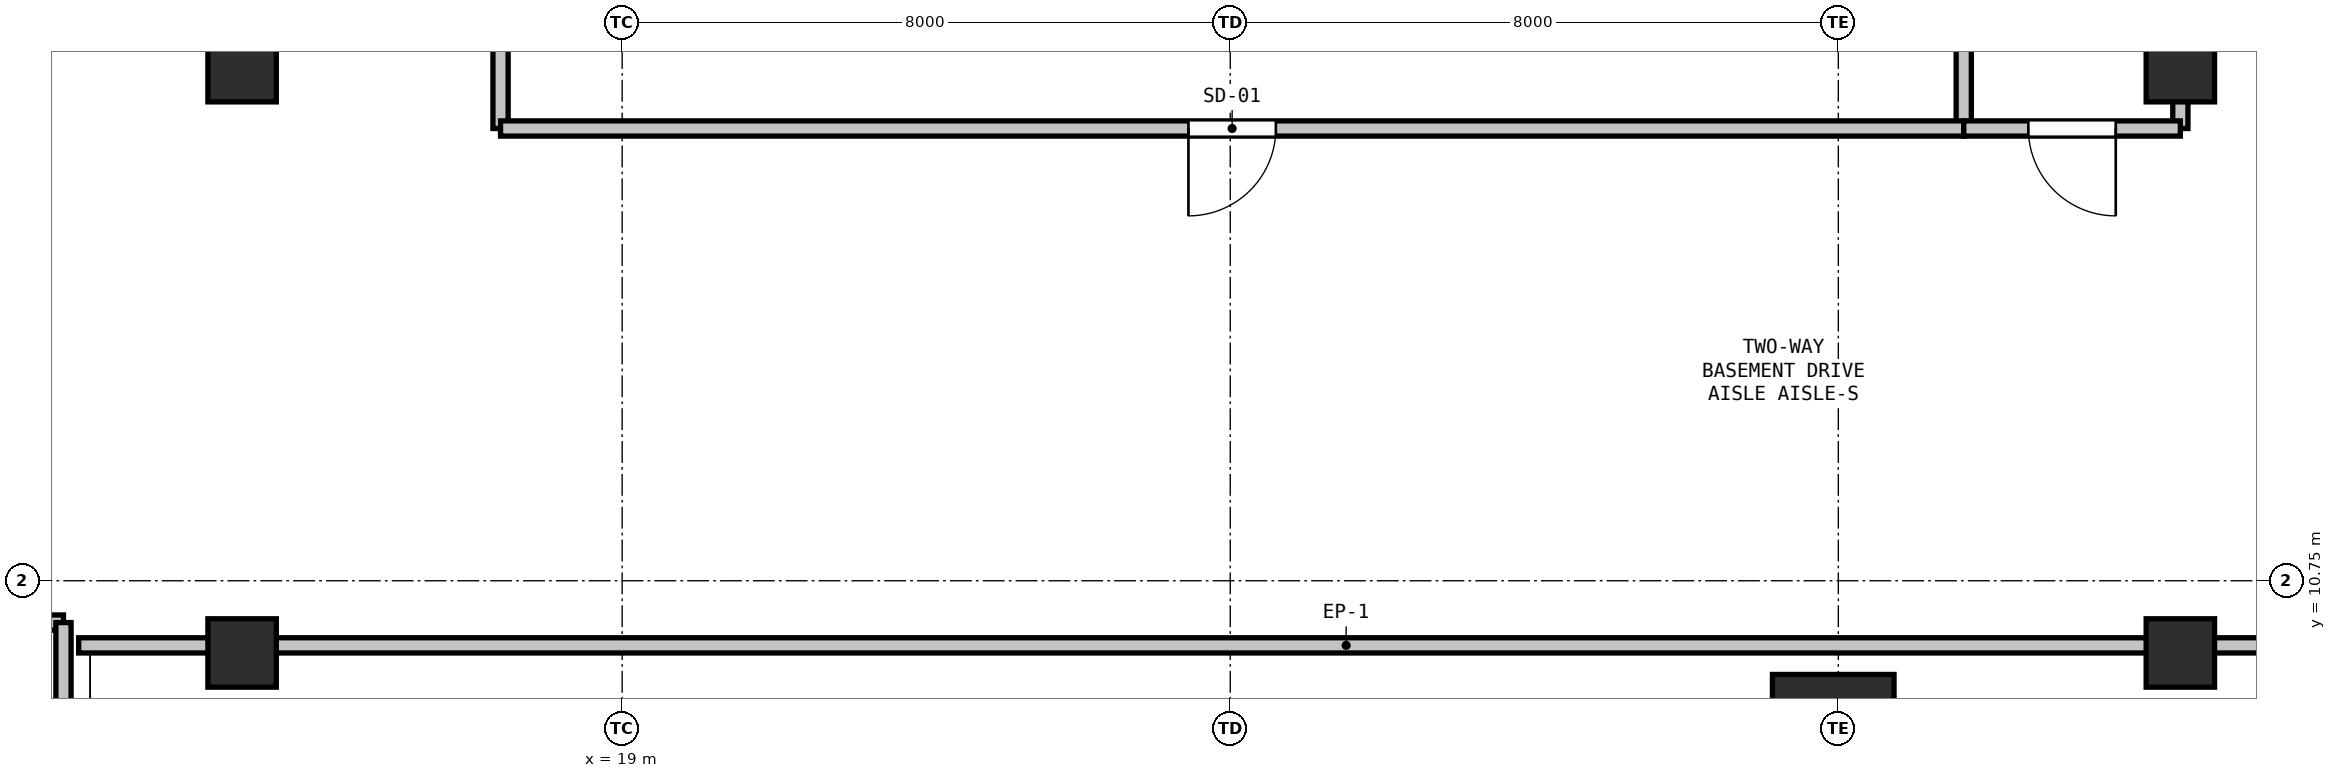
"""IFC4 building model, lengths in metres.
Left out: names, types, materials, properties, quantities, classifications, styles, units other than length and angle.
Written with IfcOpenShell. Run it as: python <this file> out.ifc"""

import sys

from ifc_helpers import new_model, si_unit, direction, frame, frame_2d, origin, origin_2d, place, context, subcontext, project, spatial, rectangle, hollow_rectangle, extrude, element, fill, save


model = new_model("IFC4")
c1 = context("Model", 3, precision=1e-05, world=origin(), true_north=direction((0.0, 1.0)))
c2 = subcontext(c1, "Body", "Model", "MODEL_VIEW")
j1 = project(units=[si_unit("LENGTHUNIT", "METRE"), si_unit("PLANEANGLEUNIT", "RADIAN")], contexts=[c1])
p1 = place(None, origin())
s1 = spatial("IfcSite", under=j1, at=p1, CompositionType="ELEMENT")
p2 = place(p1, origin())
s2 = spatial("IfcBuilding", under=s1, at=p2, CompositionType="ELEMENT")
p3 = place(p2, frame((0.0, 0.0, -9.0)))
s3 = spatial("IfcBuildingStorey", under=s2, at=p3, CompositionType="ELEMENT", Elevation=-9.0)
p4 = place(p3, frame((34.933, 8.717, 0.0), z_axis=(0.0, 0.0, 1.0), x_axis=(1.0, 0.0, 0.0)))
e1 = element("IfcColumn", 1, at=p4, inside=s3, PredefinedType="COLUMN", context=c2, shape_type="SweptSolid", body=[
    extrude(hollow_rectangle(XDim=1.6, YDim=1.6, WallThickness=0.04, at=origin_2d()), origin(), (0.0, 0.0, 1.0), 4.5),
])
for number, where, z_axis, x_axis in (
    (2, (14.0, 9.8, 0.0), (0.0, 0.0, 1.0), (1.0, 0.0, 0.0)),
    (3, (14.0, 17.5, 0.0), (0.0, 0.0, 1.0), (1.0, 0.0, 0.0)),
    (4, (39.5, 9.8, 0.0), (0.0, 0.0, 1.0), (1.0, 0.0, 0.0)),
    (5, (39.5, 17.5, 0.0), (0.0, 0.0, 1.0), (1.0, 0.0, 0.0)),
):
    element("IfcColumn", number, at=place(p3, frame(where, z_axis=z_axis, x_axis=x_axis)), inside=s3, PredefinedType="COLUMN", context=c2, shape_type="SweptSolid", body=[
        extrude(rectangle(XDim=0.9, YDim=0.9, at=origin_2d()), origin(), (0.0, 0.0, 1.0), 4.5),
    ])
p5 = place(p3, frame((11.85, 9.9, 0.0), z_axis=(0.0, 0.0, 1.0), x_axis=(1.0, 0.0, 0.0)))
e6 = element("IfcWall", 6, at=p5, inside=s3, PredefinedType="PARAPET", context=c2, shape_type="SweptSolid", body=[
    extrude(rectangle(XDim=33.35, YDim=0.2, at=frame_2d((16.675, 0.0))), origin(), (0.0, 0.0, 1.0), 5.75),
])
p6 = place(p3, frame((17.4, 16.7, 0.0), z_axis=(0.0, 0.0, 1.0), x_axis=(0.0, 1.0, 0.0)))
e7 = element("IfcWall", 7, at=p6, inside=s3, PredefinedType="PARTITIONING", context=c2, shape_type="SweptSolid", body=[
    extrude(rectangle(XDim=18.7, YDim=0.2, at=frame_2d((9.35, 0.0))), origin(), (0.0, 0.0, 1.0), 4.2),
])
p7 = place(p6, frame((1.725, 0.0, 0.0)))
e8 = element("IfcOpeningElement", 8, at=p7, cuts=e7, PredefinedType="OPENING", context=c2, shape_type="SweptSolid", body=[
    extrude(rectangle(XDim=1.15, YDim=2.15, at=frame_2d((0.575, 1.075))), frame((0.0, 0.11, 0.0), z_axis=(0.0, -1.0, 0.0), x_axis=(1.0, 0.0, 0.0)), (0.0, 0.0, 1.0), 0.22),
])
p8 = place(p6, frame((5.347, 0.0, 0.0)))
e9 = element("IfcOpeningElement", 9, at=p8, cuts=e7, PredefinedType="OPENING", context=c2, shape_type="SweptSolid", body=[
    extrude(rectangle(XDim=1.15, YDim=2.15, at=frame_2d((0.575, 1.075))), frame((0.0, 0.11, 0.0), z_axis=(0.0, -1.0, 0.0), x_axis=(1.0, 0.0, 0.0)), (0.0, 0.0, 1.0), 0.22),
])
p9 = place(p3, frame((36.65, 19.9, 0.0), z_axis=(0.0, 0.0, 1.0), x_axis=(0.0, -1.0, 0.0)))
e10 = element("IfcWall", 10, at=p9, inside=s3, PredefinedType="PARTITIONING", context=c2, shape_type="SweptSolid", body=[
    extrude(rectangle(XDim=3.2, YDim=0.2, at=frame_2d((1.6, 0.0))), origin(), (0.0, 0.0, 1.0), 4.2),
])
p10 = place(p9, frame((1.1, 0.0, 0.0)))
e11 = element("IfcOpeningElement", 11, at=p10, cuts=e10, PredefinedType="OPENING", context=c2, shape_type="SweptSolid", body=[
    extrude(rectangle(XDim=1.0, YDim=2.15, at=frame_2d((0.5, 1.075))), frame((0.0, 0.11, 0.0), z_axis=(0.0, -1.0, 0.0), x_axis=(1.0, 0.0, 0.0)), (0.0, 0.0, 1.0), 0.22),
])
p11 = place(p3, frame((36.65, 16.7, 0.0), z_axis=(0.0, 0.0, 1.0), x_axis=(-1.0, 0.0, 0.0)))
e12 = element("IfcWall", 12, at=p11, inside=s3, PredefinedType="PARTITIONING", context=c2, shape_type="SweptSolid", body=[
    extrude(rectangle(XDim=19.25, YDim=0.2, at=frame_2d((9.625, 0.0))), origin(), (0.0, 0.0, 1.0), 4.2),
])
p12 = place(p11, frame((9.05, 0.0, 0.0)))
e13 = element("IfcOpeningElement", 13, at=p12, cuts=e12, PredefinedType="OPENING", context=c2, shape_type="SweptSolid", body=[
    extrude(rectangle(XDim=1.15, YDim=2.15, at=frame_2d((0.575, 1.075))), frame((0.0, 0.11, 0.0), z_axis=(0.0, -1.0, 0.0), x_axis=(1.0, 0.0, 0.0)), (0.0, 0.0, 1.0), 0.22),
])
p13 = place(p3, frame((39.5, 36.8, 0.0), z_axis=(0.0, 0.0, 1.0), x_axis=(0.0, -1.0, 0.0)))
e14 = element("IfcWall", 14, at=p13, inside=s3, PredefinedType="PARTITIONING", context=c2, shape_type="SweptSolid", body=[
    extrude(rectangle(XDim=20.1, YDim=0.2, at=frame_2d((10.05, 0.0))), origin(), (0.0, 0.0, 1.0), 4.2),
])
p14 = place(p13, frame((10.884, 0.0, 0.0)))
e15 = element("IfcOpeningElement", 15, at=p14, cuts=e14, PredefinedType="OPENING", context=c2, shape_type="SweptSolid", body=[
    extrude(rectangle(XDim=1.15, YDim=2.15, at=frame_2d((0.575, 1.075))), frame((0.0, 0.11, 0.0), z_axis=(0.0, -1.0, 0.0), x_axis=(1.0, 0.0, 0.0)), (0.0, 0.0, 1.0), 0.22),
])
p15 = place(p3, frame((39.5, 16.7, 0.0), z_axis=(0.0, 0.0, 1.0), x_axis=(-1.0, 0.0, 0.0)))
e16 = element("IfcWall", 16, at=p15, inside=s3, PredefinedType="PARTITIONING", context=c2, shape_type="SweptSolid", body=[
    extrude(rectangle(XDim=2.85, YDim=0.2, at=frame_2d((1.425, 0.0))), origin(), (0.0, 0.0, 1.0), 4.2),
])
p16 = place(p15, frame((0.85, 0.0, 0.0)))
e17 = element("IfcOpeningElement", 17, at=p16, cuts=e16, PredefinedType="OPENING", context=c2, shape_type="SweptSolid", body=[
    extrude(rectangle(XDim=1.15, YDim=2.15, at=frame_2d((0.575, 1.075))), frame((0.0, 0.11, 0.0), z_axis=(0.0, -1.0, 0.0), x_axis=(1.0, 0.0, 0.0)), (0.0, 0.0, 1.0), 0.22),
])
p17 = place(p3, frame((6.0, 10.2, 0.0), z_axis=(0.0, 0.0, 1.0), x_axis=(1.0, 0.0, 0.0)))
e18 = element("IfcWall", 18, at=p17, inside=s3, PredefinedType="PARTITIONING", context=c2, shape_type="SweptSolid", body=[
    extrude(rectangle(XDim=5.65, YDim=0.2, at=frame_2d((2.825, 0.0))), origin(), (0.0, 0.0, 1.0), 4.2),
])
p18 = place(p17, frame((2.25, 0.0, 0.0)))
e19 = element("IfcOpeningElement", 19, at=p18, cuts=e18, PredefinedType="OPENING", context=c2, shape_type="SweptSolid", body=[
    extrude(rectangle(XDim=1.15, YDim=2.15, at=frame_2d((0.575, 1.075))), frame((0.0, 0.11, 0.0), z_axis=(0.0, -1.0, 0.0), x_axis=(1.0, 0.0, 0.0)), (0.0, 0.0, 1.0), 0.22),
])
p19 = place(p3, frame((11.65, 10.2, 0.0), z_axis=(0.0, 0.0, 1.0), x_axis=(0.0, -1.0, 0.0)))
e20 = element("IfcWall", 20, at=p19, inside=s3, PredefinedType="PARTITIONING", context=c2, shape_type="SweptSolid", body=[
    extrude(rectangle(XDim=7.0, YDim=0.2, at=frame_2d((3.5, 0.0))), origin(), (0.0, 0.0, 1.0), 4.2),
])
p20 = place(p12, origin())
e21 = element("IfcDoor", 21, at=p20, inside=s3, OperationType="SINGLE_SWING_RIGHT", PredefinedType="DOOR", context=c2, shape_type="SweptSolid", body=[
    extrude(rectangle(XDim=1.15, YDim=2.15, at=frame_2d((0.575, 1.075))), frame((0.0, 0.025, 0.0), z_axis=(0.0, -1.0, 0.0), x_axis=(1.0, 0.0, 0.0)), (0.0, 0.0, 1.0), 0.05),
])
fill(e13, e21)
p21 = place(p16, origin())
e22 = element("IfcDoor", 22, at=p21, inside=s3, OperationType="SINGLE_SWING_LEFT", PredefinedType="DOOR", context=c2, shape_type="SweptSolid", body=[
    extrude(rectangle(XDim=1.15, YDim=2.15, at=frame_2d((0.575, 1.075))), frame((0.0, 0.025, 0.0), z_axis=(0.0, -1.0, 0.0), x_axis=(1.0, 0.0, 0.0)), (0.0, 0.0, 1.0), 0.05),
])
fill(e17, e22)
save(model, sys.argv[1])
